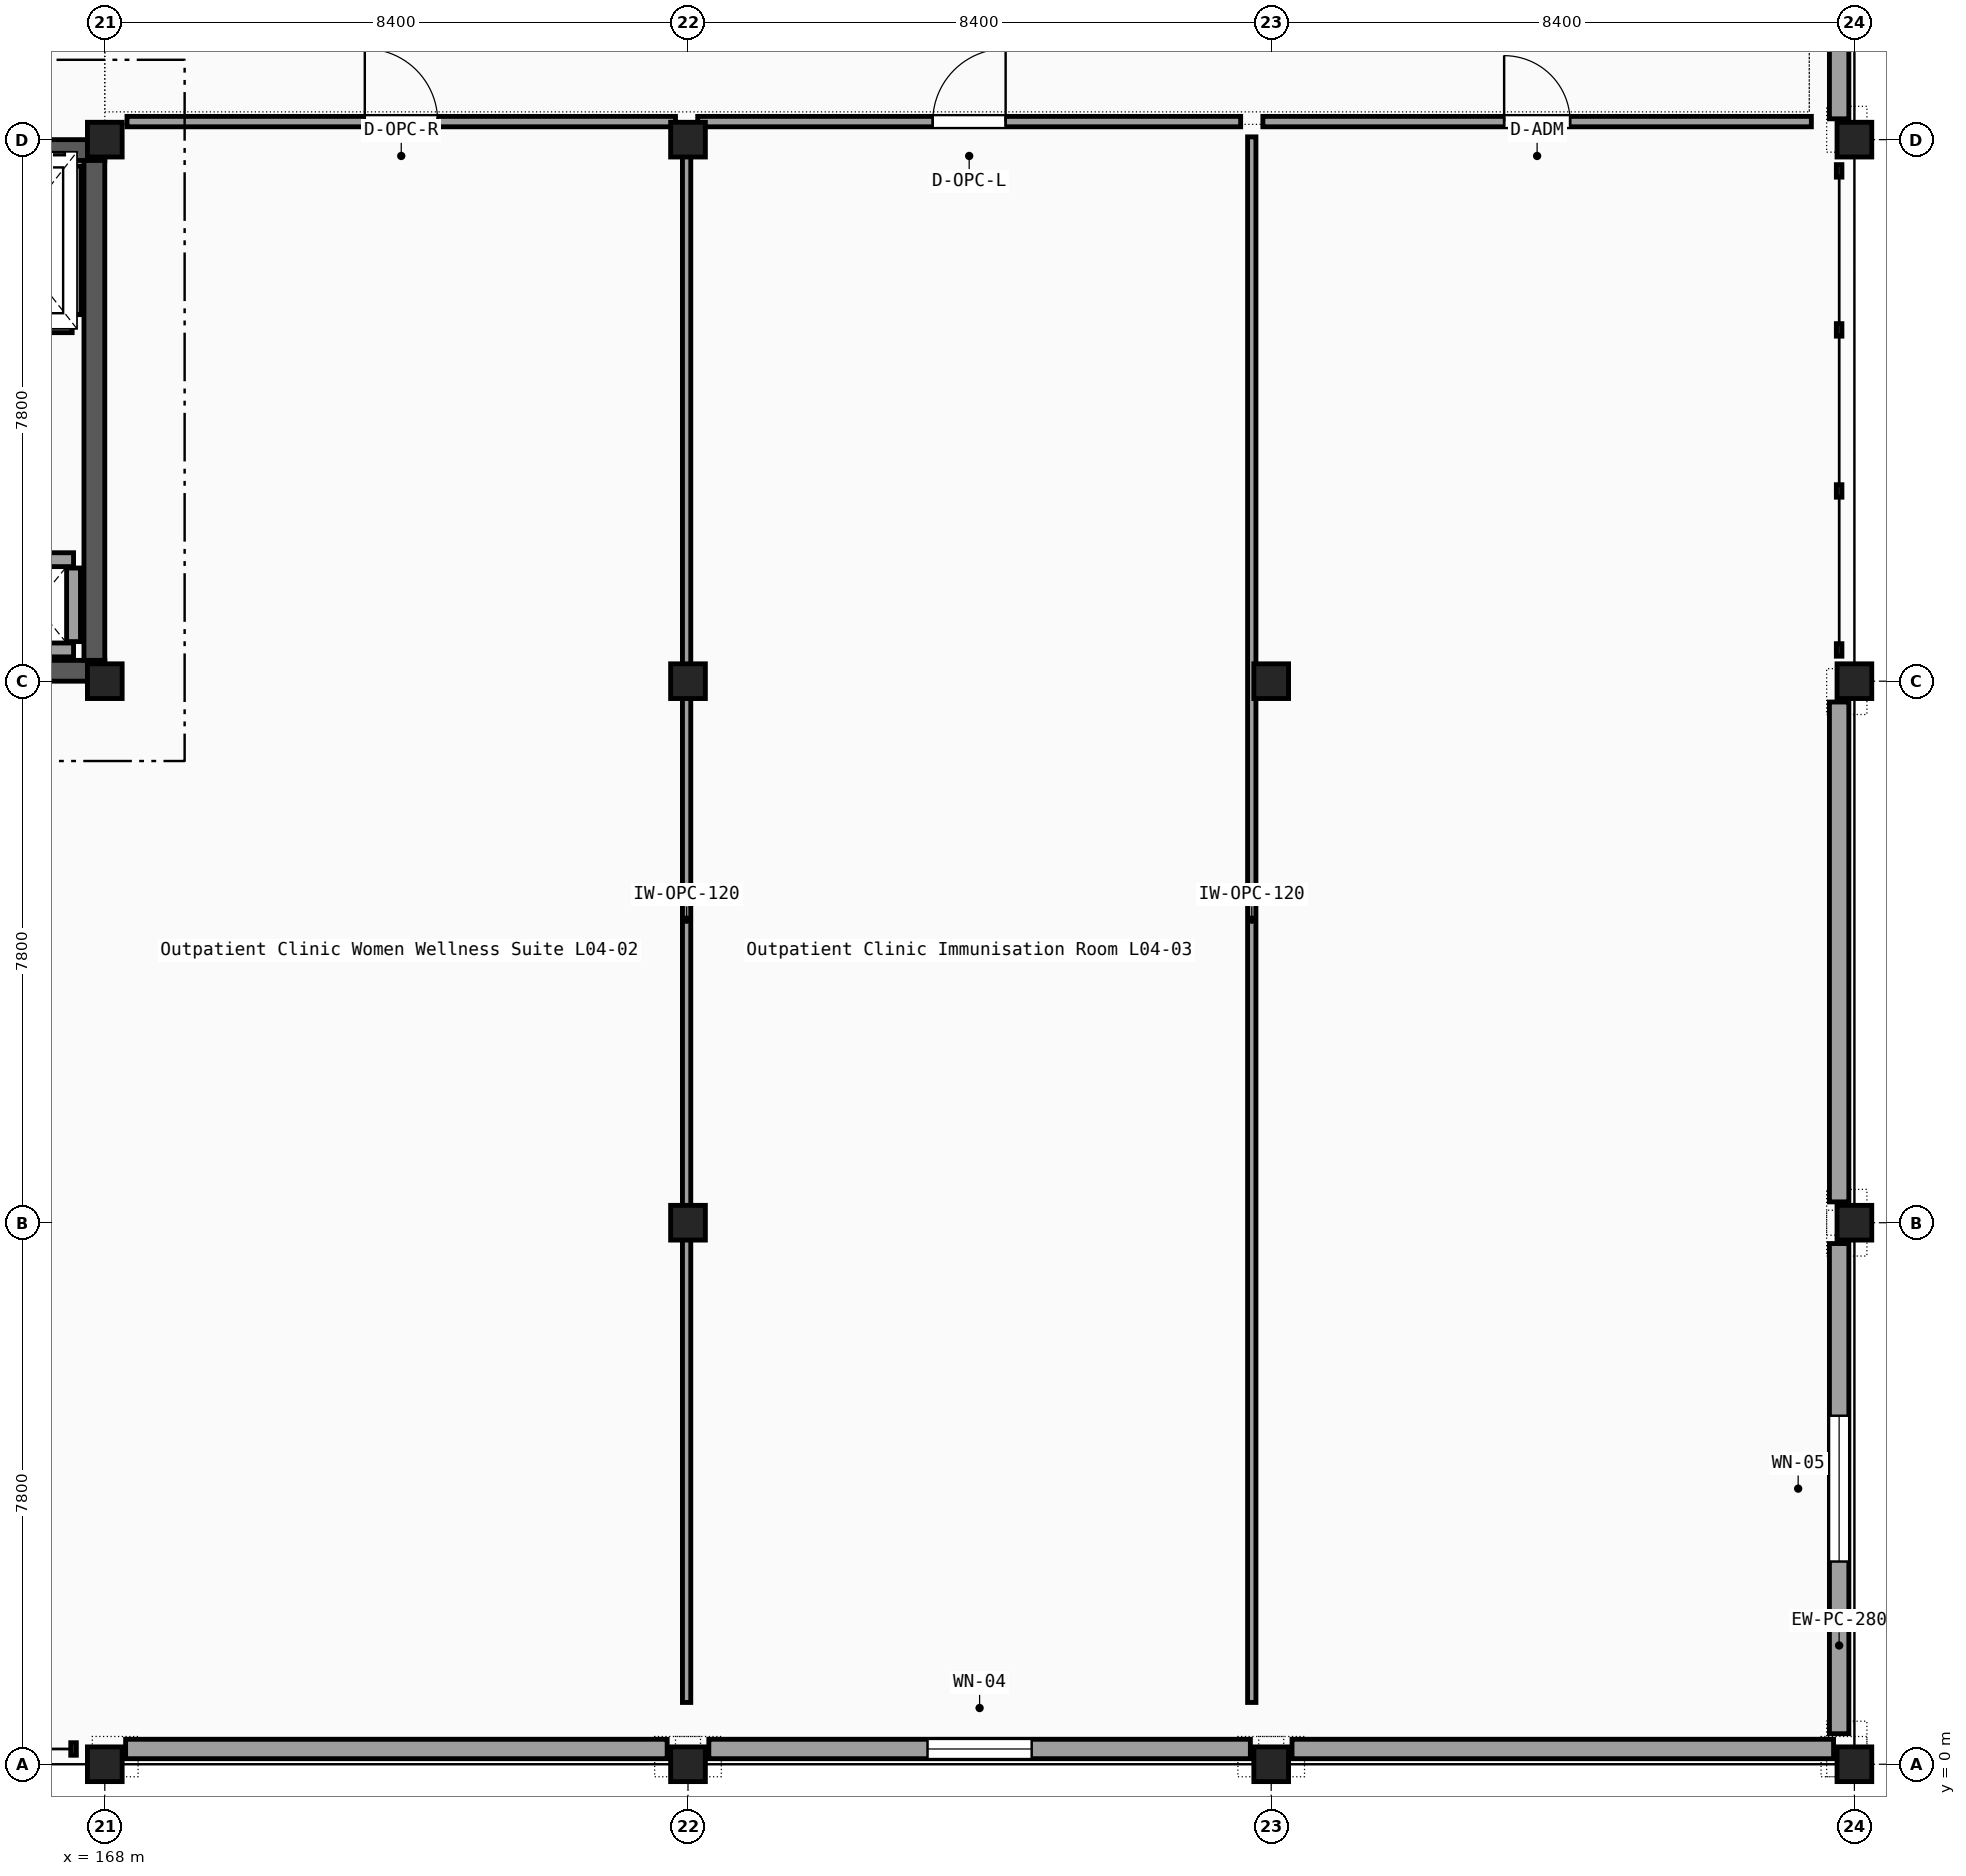
"""IFC4 building model, lengths in metres.
Left out: names, types, materials, properties, quantities, classifications, styles, units other than length and angle.
Written with IfcOpenShell. Run it as: python <this file> out.ifc"""

import sys

from ifc_helpers import new_model, si_unit, direction, frame, frame_2d, origin, origin_2d, place, context, subcontext, project, spatial, rectangle, extrude, element, fill, save


model = new_model("IFC4")
c1 = context("Model", 3, precision=1e-05, world=origin(), true_north=direction((0.0, 1.0)))
c2 = subcontext(c1, "Body", "Model", "MODEL_VIEW")
j1 = project(units=[si_unit("LENGTHUNIT", "METRE"), si_unit("PLANEANGLEUNIT", "RADIAN")], contexts=[c1])
p1 = place(None, origin())
s1 = spatial("IfcSite", under=j1, at=p1, CompositionType="ELEMENT")
p2 = place(p1, origin())
s2 = spatial("IfcBuilding", under=s1, at=p2, CompositionType="ELEMENT")
p3 = place(p2, frame((0.0, 0.0, 18.9)))
s3 = spatial("IfcBuildingStorey", under=s2, at=p3, CompositionType="ELEMENT", Elevation=18.9)
for number, where, z_axis, x_axis in (
    (1, (168.0, 0.0, 0.0), (0.0, 0.0, 1.0), (1.0, 0.0, 0.0)),
    (2, (168.0, 15.6, 0.0), (0.0, 0.0, 1.0), (1.0, 0.0, 0.0)),
    (3, (168.0, 23.4, 0.0), (0.0, 0.0, 1.0), (1.0, 0.0, 0.0)),
    (4, (176.4, 0.0, 0.0), (0.0, 0.0, 1.0), (1.0, 0.0, 0.0)),
    (5, (176.4, 7.8, 0.0), (0.0, 0.0, 1.0), (1.0, 0.0, 0.0)),
    (6, (176.4, 15.6, 0.0), (0.0, 0.0, 1.0), (1.0, 0.0, 0.0)),
    (7, (176.4, 23.4, 0.0), (0.0, 0.0, 1.0), (1.0, 0.0, 0.0)),
    (8, (184.8, 0.0, 0.0), (0.0, 0.0, 1.0), (1.0, 0.0, 0.0)),
    (9, (184.8, 15.6, 0.0), (0.0, 0.0, 1.0), (1.0, 0.0, 0.0)),
    (10, (193.2, 0.0, 0.0), (0.0, 0.0, 1.0), (1.0, 0.0, 0.0)),
    (11, (193.2, 7.8, 0.0), (0.0, 0.0, 1.0), (1.0, 0.0, 0.0)),
    (12, (193.2, 15.6, 0.0), (0.0, 0.0, 1.0), (1.0, 0.0, 0.0)),
    (13, (193.2, 23.4, 0.0), (0.0, 0.0, 1.0), (1.0, 0.0, 0.0)),
):
    element("IfcColumn", number, at=place(p3, frame(where, z_axis=z_axis, x_axis=x_axis)), inside=s3, PredefinedType="COLUMN", context=c2, shape_type="SweptSolid", body=[
        extrude(rectangle(XDim=0.5, YDim=0.5, at=origin_2d()), origin(), (0.0, 0.0, 1.0), 4.05),
    ])
p4 = place(p3, frame((168.3, 0.22, 0.0), z_axis=(0.0, 0.0, 1.0), x_axis=(1.0, 0.0, 0.0)))
e14 = element("IfcWall", 14, at=p4, inside=s3, PredefinedType="SOLIDWALL", context=c2, shape_type="SweptSolid", body=[
    extrude(rectangle(XDim=7.8, YDim=0.28, at=frame_2d((3.9, 0.0))), origin(), (0.0, 0.0, 1.0), 3.44),
])
p5 = place(p3, frame((176.7, 0.22, 0.0), z_axis=(0.0, 0.0, 1.0), x_axis=(1.0, 0.0, 0.0)))
e15 = element("IfcWall", 15, at=p5, inside=s3, PredefinedType="SOLIDWALL", context=c2, shape_type="SweptSolid", body=[
    extrude(rectangle(XDim=7.8, YDim=0.28, at=frame_2d((3.9, 0.0))), origin(), (0.0, 0.0, 1.0), 3.44),
])
p6 = place(p5, frame((3.15, 0.0, 0.95)))
e16 = element("IfcOpeningElement", 16, at=p6, cuts=e15, PredefinedType="OPENING", context=c2, shape_type="SweptSolid", body=[
    extrude(rectangle(XDim=1.5, YDim=1.5, at=frame_2d((0.75, 0.75))), frame((0.0, 0.15, 0.0), z_axis=(0.0, -1.0, 0.0), x_axis=(1.0, 0.0, 0.0)), (0.0, 0.0, 1.0), 0.3),
])
p7 = place(p3, frame((185.1, 0.22, 0.0), z_axis=(0.0, 0.0, 1.0), x_axis=(1.0, 0.0, 0.0)))
e17 = element("IfcWall", 17, at=p7, inside=s3, PredefinedType="SOLIDWALL", context=c2, shape_type="SweptSolid", body=[
    extrude(rectangle(XDim=7.8, YDim=0.28, at=frame_2d((3.9, 0.0))), origin(), (0.0, 0.0, 1.0), 3.44),
])
p8 = place(p3, frame((192.98, 0.44, 0.0), z_axis=(0.0, 0.0, 1.0), x_axis=(0.0, 1.0, 0.0)))
e18 = element("IfcWall", 18, at=p8, inside=s3, PredefinedType="SOLIDWALL", context=c2, shape_type="SweptSolid", body=[
    extrude(rectangle(XDim=7.06, YDim=0.28, at=frame_2d((3.53, 0.0))), origin(), (0.0, 0.0, 1.0), 3.77),
])
p9 = place(p8, frame((2.48, 0.0, 0.95)))
e19 = element("IfcOpeningElement", 19, at=p9, cuts=e18, PredefinedType="OPENING", context=c2, shape_type="SweptSolid", body=[
    extrude(rectangle(XDim=2.1, YDim=1.5, at=frame_2d((1.05, 0.75))), frame((0.0, 0.15, 0.0), z_axis=(0.0, -1.0, 0.0), x_axis=(1.0, 0.0, 0.0)), (0.0, 0.0, 1.0), 0.3),
])
for number, where, z_axis, x_axis in (
    (20, (192.98, 8.1, 0.0), (0.0, 0.0, 1.0), (0.0, 1.0, 0.0)),
    (21, (192.98, 23.7, 0.0), (0.0, 0.0, 1.0), (0.0, 1.0, 0.0)),
):
    element("IfcWall", number, at=place(p3, frame(where, z_axis=z_axis, x_axis=x_axis)), inside=s3, PredefinedType="SOLIDWALL", context=c2, shape_type="SweptSolid", body=[
        extrude(rectangle(XDim=7.2, YDim=0.28, at=frame_2d((3.6, 0.0))), origin(), (0.0, 0.0, 1.0), 3.77),
    ])
p10 = place(p3, frame((159.6, 15.75, 0.0), z_axis=(0.0, 0.0, 1.0), x_axis=(1.0, 0.0, 0.0)))
e22 = element("IfcWall", 22, at=p10, inside=s3, PredefinedType="SHEAR", context=c2, shape_type="SweptSolid", body=[
    extrude(rectangle(XDim=8.4, YDim=0.3, at=frame_2d((4.2, 0.0))), origin(), (0.0, 0.0, 1.0), 3.8),
])
p11 = place(p3, frame((159.6, 23.25, 0.0), z_axis=(0.0, 0.0, 1.0), x_axis=(1.0, 0.0, 0.0)))
e23 = element("IfcWall", 23, at=p11, inside=s3, PredefinedType="SHEAR", context=c2, shape_type="SweptSolid", body=[
    extrude(rectangle(XDim=8.4, YDim=0.3, at=frame_2d((4.2, 0.0))), origin(), (0.0, 0.0, 1.0), 3.8),
])
p12 = place(p11, frame((1.38, 0.0, 0.0)))
e24 = element("IfcOpeningElement", 24, at=p12, cuts=e23, PredefinedType="OPENING", context=c2, shape_type="SweptSolid", body=[
    extrude(rectangle(XDim=1.2, YDim=2.15, at=frame_2d((0.6, 1.075))), frame((0.0, 0.16, 0.0), z_axis=(0.0, -1.0, 0.0), x_axis=(1.0, 0.0, 0.0)), (0.0, 0.0, 1.0), 0.32),
])
p13 = place(p11, frame((4.43, 0.0, 0.0)))
e25 = element("IfcOpeningElement", 25, at=p13, cuts=e23, PredefinedType="OPENING", context=c2, shape_type="SweptSolid", body=[
    extrude(rectangle(XDim=1.1, YDim=2.15, at=frame_2d((0.55, 1.075))), frame((0.0, 0.16, 0.0), z_axis=(0.0, -1.0, 0.0), x_axis=(1.0, 0.0, 0.0)), (0.0, 0.0, 1.0), 0.32),
])
p14 = place(p11, frame((6.45, 0.0, 0.0)))
e26 = element("IfcOpeningElement", 26, at=p14, cuts=e23, PredefinedType="OPENING", context=c2, shape_type="SweptSolid", body=[
    extrude(rectangle(XDim=1.1, YDim=2.15, at=frame_2d((0.55, 1.075))), frame((0.0, 0.16, 0.0), z_axis=(0.0, -1.0, 0.0), x_axis=(1.0, 0.0, 0.0)), (0.0, 0.0, 1.0), 0.32),
])
p15 = place(p3, frame((167.85, 15.9, 0.0), z_axis=(0.0, 0.0, 1.0), x_axis=(0.0, 1.0, 0.0)))
e27 = element("IfcWall", 27, at=p15, inside=s3, PredefinedType="SHEAR", context=c2, shape_type="SweptSolid", body=[
    extrude(rectangle(XDim=7.2, YDim=0.3, at=frame_2d((3.6, 0.0))), origin(), (0.0, 0.0, 1.0), 3.8),
])
for number, where, z_axis, x_axis in (
    (28, (166.45, 16.05, 0.0), (0.0, 0.0, 1.0), (1.0, 0.0, 0.0)),
    (29, (166.45, 17.35, 0.0), (0.0, 0.0, 1.0), (1.0, 0.0, 0.0)),
):
    element("IfcWall", number, at=place(p3, frame(where, z_axis=z_axis, x_axis=x_axis)), inside=s3, PredefinedType="PARTITIONING", context=c2, shape_type="SweptSolid", body=[
        extrude(rectangle(XDim=1.1, YDim=0.2, at=frame_2d((0.55, 0.0))), origin(), (0.0, 0.0, 1.0), 3.44),
    ])
p16 = place(p3, frame((167.55, 16.17, 0.0), z_axis=(0.0, 0.0, 1.0), x_axis=(0.0, 1.0, 0.0)))
e30 = element("IfcWall", 30, at=p16, inside=s3, PredefinedType="PARTITIONING", context=c2, shape_type="SweptSolid", body=[
    extrude(rectangle(XDim=1.06, YDim=0.2, at=frame_2d((0.53, 0.0))), origin(), (0.0, 0.0, 1.0), 3.44),
])
p17 = place(p3, frame((167.56, 20.88, 0.0), z_axis=(0.0, 0.0, 1.0), x_axis=(0.0, 1.0, 0.0)))
e31 = element("IfcWall", 31, at=p17, inside=s3, PredefinedType="PARTITIONING", context=c2, shape_type="SweptSolid", body=[
    extrude(rectangle(XDim=2.14, YDim=0.2, at=frame_2d((1.07, 0.0))), origin(), (0.0, 0.0, 1.0), 3.44),
])
p18 = place(p3, frame((165.67, 20.72, 0.0), z_axis=(0.0, 0.0, 1.0), x_axis=(1.0, 0.0, 0.0)))
e32 = element("IfcWall", 32, at=p18, inside=s3, PredefinedType="PARTITIONING", context=c2, shape_type="SweptSolid", body=[
    extrude(rectangle(XDim=1.86, YDim=0.2, at=frame_2d((0.93, 0.0))), origin(), (0.0, 0.0, 1.0), 3.44),
])
p19 = place(p3, frame((168.32, 23.66, 0.0), z_axis=(0.0, 0.0, 1.0), x_axis=(1.0, 0.0, 0.0)))
e33 = element("IfcWall", 33, at=p19, inside=s3, PredefinedType="PARTITIONING", context=c2, shape_type="SweptSolid", body=[
    extrude(rectangle(XDim=7.9, YDim=0.15, at=frame_2d((3.95, 0.0))), origin(), (0.0, 0.0, 1.0), 3.44),
])
p20 = place(p19, frame((3.425, 0.0, 0.0)))
e34 = element("IfcOpeningElement", 34, at=p20, cuts=e33, PredefinedType="OPENING", context=c2, shape_type="SweptSolid", body=[
    extrude(rectangle(XDim=1.05, YDim=2.15, at=frame_2d((0.525, 1.075))), frame((0.0, 0.085, 0.0), z_axis=(0.0, -1.0, 0.0), x_axis=(1.0, 0.0, 0.0)), (0.0, 0.0, 1.0), 0.17),
])
p21 = place(p3, frame((176.38, 0.89, 0.0), z_axis=(0.0, 0.0, 1.0), x_axis=(0.0, 1.0, 0.0)))
e35 = element("IfcWall", 35, at=p21, inside=s3, PredefinedType="PARTITIONING", context=c2, shape_type="SweptSolid", body=[
    extrude(rectangle(XDim=22.55, YDim=0.12, at=frame_2d((11.275, 0.0))), origin(), (0.0, 0.0, 1.0), 3.44),
])
p22 = place(p3, frame((176.54, 23.66, 0.0), z_axis=(0.0, 0.0, 1.0), x_axis=(1.0, 0.0, 0.0)))
e36 = element("IfcWall", 36, at=p22, inside=s3, PredefinedType="PARTITIONING", context=c2, shape_type="SweptSolid", body=[
    extrude(rectangle(XDim=7.82, YDim=0.15, at=frame_2d((3.91, 0.0))), origin(), (0.0, 0.0, 1.0), 3.44),
])
p23 = place(p22, frame((3.385, 0.0, 0.0)))
e37 = element("IfcOpeningElement", 37, at=p23, cuts=e36, PredefinedType="OPENING", context=c2, shape_type="SweptSolid", body=[
    extrude(rectangle(XDim=1.05, YDim=2.15, at=frame_2d((0.525, 1.075))), frame((0.0, 0.085, 0.0), z_axis=(0.0, -1.0, 0.0), x_axis=(1.0, 0.0, 0.0)), (0.0, 0.0, 1.0), 0.17),
])
p24 = place(p3, frame((184.52, 0.89, 0.0), z_axis=(0.0, 0.0, 1.0), x_axis=(0.0, 1.0, 0.0)))
e38 = element("IfcWall", 38, at=p24, inside=s3, PredefinedType="PARTITIONING", context=c2, shape_type="SweptSolid", body=[
    extrude(rectangle(XDim=22.55, YDim=0.12, at=frame_2d((11.275, 0.0))), origin(), (0.0, 0.0, 1.0), 3.44),
])
p25 = place(p3, frame((184.68, 23.66, 0.0), z_axis=(0.0, 0.0, 1.0), x_axis=(1.0, 0.0, 0.0)))
e39 = element("IfcWall", 39, at=p25, inside=s3, PredefinedType="PARTITIONING", context=c2, shape_type="SweptSolid", body=[
    extrude(rectangle(XDim=7.9, YDim=0.15, at=frame_2d((3.95, 0.0))), origin(), (0.0, 0.0, 1.0), 3.44),
])
p26 = place(p25, frame((3.475, 0.0, 0.0)))
e40 = element("IfcOpeningElement", 40, at=p26, cuts=e39, PredefinedType="OPENING", context=c2, shape_type="SweptSolid", body=[
    extrude(rectangle(XDim=0.95, YDim=2.1, at=frame_2d((0.475, 1.05))), frame((0.0, 0.085, 0.0), z_axis=(0.0, -1.0, 0.0), x_axis=(1.0, 0.0, 0.0)), (0.0, 0.0, 1.0), 0.17),
])
p27 = place(p6, origin())
e41 = element("IfcWindow", 41, at=p27, inside=s3, PartitioningType="SINGLE_PANEL", PredefinedType="WINDOW", context=c2, shape_type="SweptSolid", body=[
    extrude(rectangle(XDim=1.5, YDim=1.5, at=frame_2d((0.75, 0.75))), frame((0.0, 0.03, 0.0), z_axis=(0.0, -1.0, 0.0), x_axis=(1.0, 0.0, 0.0)), (0.0, 0.0, 1.0), 0.06),
])
fill(e16, e41)
p28 = place(p9, origin())
e42 = element("IfcWindow", 42, at=p28, inside=s3, PartitioningType="SINGLE_PANEL", PredefinedType="WINDOW", context=c2, shape_type="SweptSolid", body=[
    extrude(rectangle(XDim=2.1, YDim=1.5, at=frame_2d((1.05, 0.75))), frame((0.0, 0.03, 0.0), z_axis=(0.0, -1.0, 0.0), x_axis=(1.0, 0.0, 0.0)), (0.0, 0.0, 1.0), 0.06),
])
fill(e19, e42)
p29 = place(p20, origin())
e43 = element("IfcDoor", 43, at=p29, inside=s3, OperationType="SINGLE_SWING_LEFT", PredefinedType="DOOR", context=c2, shape_type="SweptSolid", body=[
    extrude(rectangle(XDim=1.05, YDim=2.15, at=frame_2d((0.525, 1.075))), frame((0.0, 0.025, 0.0), z_axis=(0.0, -1.0, 0.0), x_axis=(1.0, 0.0, 0.0)), (0.0, 0.0, 1.0), 0.05),
])
fill(e34, e43)
p30 = place(p23, origin())
e44 = element("IfcDoor", 44, at=p30, inside=s3, OperationType="SINGLE_SWING_RIGHT", PredefinedType="DOOR", context=c2, shape_type="SweptSolid", body=[
    extrude(rectangle(XDim=1.05, YDim=2.15, at=frame_2d((0.525, 1.075))), frame((0.0, 0.025, 0.0), z_axis=(0.0, -1.0, 0.0), x_axis=(1.0, 0.0, 0.0)), (0.0, 0.0, 1.0), 0.05),
])
fill(e37, e44)
p31 = place(p26, origin())
e45 = element("IfcDoor", 45, at=p31, inside=s3, OperationType="SINGLE_SWING_LEFT", PredefinedType="DOOR", context=c2, shape_type="SweptSolid", body=[
    extrude(rectangle(XDim=0.95, YDim=2.1, at=frame_2d((0.475, 1.05))), frame((0.0, 0.025, 0.0), z_axis=(0.0, -1.0, 0.0), x_axis=(1.0, 0.0, 0.0)), (0.0, 0.0, 1.0), 0.05),
])
fill(e40, e45)
save(model, sys.argv[1])
